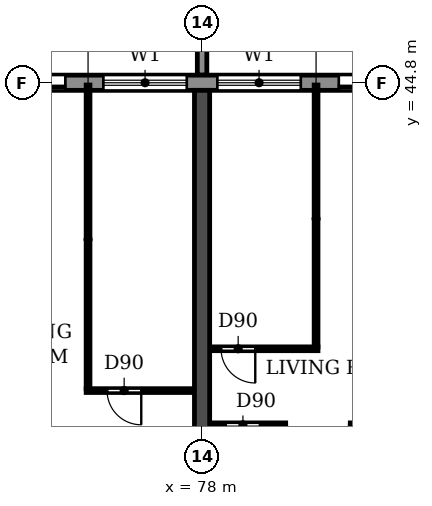
"""IFC4 building model, lengths in metres.
Left out: names, types, materials, properties, quantities, classifications, styles, units other than length and angle.
Written with IfcOpenShell. Run it as: python <this file> out.ifc"""

import sys

from ifc_helpers import new_model, si_unit, direction, frame, frame_2d, origin, place, context, subcontext, project, spatial, polyline, rectangle, outline, extrude, source, transform, mapped, element, fill, save


model = new_model("IFC4")
c1 = context("Model", 3, precision=1e-05, world=origin(), true_north=direction((0.0, 1.0)))
c2 = subcontext(c1, "Body", "Model", "MODEL_VIEW")
j1 = project(units=[si_unit("LENGTHUNIT", "METRE"), si_unit("PLANEANGLEUNIT", "RADIAN")], contexts=[c1])
p1 = place(None, origin())
s1 = spatial("IfcSite", under=j1, at=p1, CompositionType="ELEMENT")
p2 = place(p1, origin())
s2 = spatial("IfcBuilding", under=s1, at=p2, CompositionType="ELEMENT")
p3 = place(p2, frame((0.0, 0.0, 33.3)))
s3 = spatial("IfcBuildingStorey", under=s2, at=p3, CompositionType="ELEMENT", Elevation=33.3)
p4 = place(p3, frame((78.0, 30.55, 0.0), z_axis=(0.0, 0.0, 1.0), x_axis=(0.0, 1.0, 0.0)))
e1 = element("IfcWall", 1, at=p4, inside=s3, PredefinedType="SHEAR", context=c2, shape_type="SweptSolid", body=[
    extrude(rectangle(XDim=14.05, YDim=0.4, at=frame_2d((7.025, 0.0))), origin(), (0.0, 0.0, 1.0), 3.05),
])
p5 = place(p3, frame((97.317, 44.8, 0.0), z_axis=(0.0, 0.0, 1.0), x_axis=(-1.0, 0.0, 0.0)))
e2 = element("IfcWall", 2, at=p5, inside=s3, PredefinedType="STANDARD", context=c2, shape_type="SweptSolid", body=[
    extrude(rectangle(XDim=92.634, YDim=0.4, at=frame_2d((46.317, 0.0))), origin(), (0.0, 0.0, 1.0), 3.05),
])
p6 = place(p5, frame((88.717, 0.0, 0.9)))
e3 = element("IfcOpeningElement", 3, at=p6, cuts=e2, PredefinedType="OPENING", context=c2, shape_type="SweptSolid", body=[
    extrude(rectangle(XDim=2.2, YDim=1.5, at=frame_2d((1.1, 0.75))), frame((0.0, 0.21, 0.0), z_axis=(0.0, -1.0, 0.0), x_axis=(1.0, 0.0, 0.0)), (0.0, 0.0, 1.0), 0.42),
])
p7 = place(p5, frame((85.917, 0.0, 0.0)))
e4 = element("IfcOpeningElement", 4, at=p7, cuts=e2, PredefinedType="OPENING", context=c2, shape_type="SweptSolid", body=[
    extrude(rectangle(XDim=1.8, YDim=2.4, at=frame_2d((0.9, 1.2))), frame((0.0, 0.21, 0.0), z_axis=(0.0, -1.0, 0.0), x_axis=(1.0, 0.0, 0.0)), (0.0, 0.0, 1.0), 0.42),
])
p8 = place(p5, frame((82.717, 0.0, 0.9)))
e5 = element("IfcOpeningElement", 5, at=p8, cuts=e2, PredefinedType="OPENING", context=c2, shape_type="SweptSolid", body=[
    extrude(rectangle(XDim=2.2, YDim=1.5, at=frame_2d((1.1, 0.75))), frame((0.0, 0.21, 0.0), z_axis=(0.0, -1.0, 0.0), x_axis=(1.0, 0.0, 0.0)), (0.0, 0.0, 1.0), 0.42),
])
p9 = place(p5, frame((79.917, 0.0, 0.0)))
e6 = element("IfcOpeningElement", 6, at=p9, cuts=e2, PredefinedType="OPENING", context=c2, shape_type="SweptSolid", body=[
    extrude(rectangle(XDim=1.8, YDim=2.4, at=frame_2d((0.9, 1.2))), frame((0.0, 0.21, 0.0), z_axis=(0.0, -1.0, 0.0), x_axis=(1.0, 0.0, 0.0)), (0.0, 0.0, 1.0), 0.42),
])
p10 = place(p5, frame((76.717, 0.0, 0.9)))
e7 = element("IfcOpeningElement", 7, at=p10, cuts=e2, PredefinedType="OPENING", context=c2, shape_type="SweptSolid", body=[
    extrude(rectangle(XDim=2.2, YDim=1.5, at=frame_2d((1.1, 0.75))), frame((0.0, 0.21, 0.0), z_axis=(0.0, -1.0, 0.0), x_axis=(1.0, 0.0, 0.0)), (0.0, 0.0, 1.0), 0.42),
])
p11 = place(p5, frame((73.717, 0.0, 0.9)))
e8 = element("IfcOpeningElement", 8, at=p11, cuts=e2, PredefinedType="OPENING", context=c2, shape_type="SweptSolid", body=[
    extrude(rectangle(XDim=2.2, YDim=1.5, at=frame_2d((1.1, 0.75))), frame((0.0, 0.21, 0.0), z_axis=(0.0, -1.0, 0.0), x_axis=(1.0, 0.0, 0.0)), (0.0, 0.0, 1.0), 0.42),
])
p12 = place(p5, frame((70.717, 0.0, 0.9)))
e9 = element("IfcOpeningElement", 9, at=p12, cuts=e2, PredefinedType="OPENING", context=c2, shape_type="SweptSolid", body=[
    extrude(rectangle(XDim=2.2, YDim=1.5, at=frame_2d((1.1, 0.75))), frame((0.0, 0.21, 0.0), z_axis=(0.0, -1.0, 0.0), x_axis=(1.0, 0.0, 0.0)), (0.0, 0.0, 1.0), 0.42),
])
p13 = place(p5, frame((67.917, 0.0, 0.0)))
e10 = element("IfcOpeningElement", 10, at=p13, cuts=e2, PredefinedType="OPENING", context=c2, shape_type="SweptSolid", body=[
    extrude(rectangle(XDim=1.8, YDim=2.4, at=frame_2d((0.9, 1.2))), frame((0.0, 0.21, 0.0), z_axis=(0.0, -1.0, 0.0), x_axis=(1.0, 0.0, 0.0)), (0.0, 0.0, 1.0), 0.42),
])
p14 = place(p5, frame((64.717, 0.0, 0.9)))
e11 = element("IfcOpeningElement", 11, at=p14, cuts=e2, PredefinedType="OPENING", context=c2, shape_type="SweptSolid", body=[
    extrude(rectangle(XDim=2.2, YDim=1.5, at=frame_2d((1.1, 0.75))), frame((0.0, 0.21, 0.0), z_axis=(0.0, -1.0, 0.0), x_axis=(1.0, 0.0, 0.0)), (0.0, 0.0, 1.0), 0.42),
])
p15 = place(p5, frame((61.717, 0.0, 0.9)))
e12 = element("IfcOpeningElement", 12, at=p15, cuts=e2, PredefinedType="OPENING", context=c2, shape_type="SweptSolid", body=[
    extrude(rectangle(XDim=2.2, YDim=1.5, at=frame_2d((1.1, 0.75))), frame((0.0, 0.21, 0.0), z_axis=(0.0, -1.0, 0.0), x_axis=(1.0, 0.0, 0.0)), (0.0, 0.0, 1.0), 0.42),
])
p16 = place(p5, frame((58.717, 0.0, 0.9)))
e13 = element("IfcOpeningElement", 13, at=p16, cuts=e2, PredefinedType="OPENING", context=c2, shape_type="SweptSolid", body=[
    extrude(rectangle(XDim=2.2, YDim=1.5, at=frame_2d((1.1, 0.75))), frame((0.0, 0.21, 0.0), z_axis=(0.0, -1.0, 0.0), x_axis=(1.0, 0.0, 0.0)), (0.0, 0.0, 1.0), 0.42),
])
p17 = place(p5, frame((55.917, 0.0, 0.0)))
e14 = element("IfcOpeningElement", 14, at=p17, cuts=e2, PredefinedType="OPENING", context=c2, shape_type="SweptSolid", body=[
    extrude(rectangle(XDim=1.8, YDim=2.4, at=frame_2d((0.9, 1.2))), frame((0.0, 0.21, 0.0), z_axis=(0.0, -1.0, 0.0), x_axis=(1.0, 0.0, 0.0)), (0.0, 0.0, 1.0), 0.42),
])
p18 = place(p5, frame((52.717, 0.0, 0.9)))
e15 = element("IfcOpeningElement", 15, at=p18, cuts=e2, PredefinedType="OPENING", context=c2, shape_type="SweptSolid", body=[
    extrude(rectangle(XDim=2.2, YDim=1.5, at=frame_2d((1.1, 0.75))), frame((0.0, 0.21, 0.0), z_axis=(0.0, -1.0, 0.0), x_axis=(1.0, 0.0, 0.0)), (0.0, 0.0, 1.0), 0.42),
])
p19 = place(p5, frame((49.717, 0.0, 0.9)))
e16 = element("IfcOpeningElement", 16, at=p19, cuts=e2, PredefinedType="OPENING", context=c2, shape_type="SweptSolid", body=[
    extrude(rectangle(XDim=2.2, YDim=1.5, at=frame_2d((1.1, 0.75))), frame((0.0, 0.21, 0.0), z_axis=(0.0, -1.0, 0.0), x_axis=(1.0, 0.0, 0.0)), (0.0, 0.0, 1.0), 0.42),
])
p20 = place(p5, frame((46.717, 0.0, 0.9)))
e17 = element("IfcOpeningElement", 17, at=p20, cuts=e2, PredefinedType="OPENING", context=c2, shape_type="SweptSolid", body=[
    extrude(rectangle(XDim=2.2, YDim=1.5, at=frame_2d((1.1, 0.75))), frame((0.0, 0.21, 0.0), z_axis=(0.0, -1.0, 0.0), x_axis=(1.0, 0.0, 0.0)), (0.0, 0.0, 1.0), 0.42),
])
p21 = place(p5, frame((43.917, 0.0, 0.0)))
e18 = element("IfcOpeningElement", 18, at=p21, cuts=e2, PredefinedType="OPENING", context=c2, shape_type="SweptSolid", body=[
    extrude(rectangle(XDim=1.8, YDim=2.4, at=frame_2d((0.9, 1.2))), frame((0.0, 0.21, 0.0), z_axis=(0.0, -1.0, 0.0), x_axis=(1.0, 0.0, 0.0)), (0.0, 0.0, 1.0), 0.42),
])
p22 = place(p5, frame((40.717, 0.0, 0.9)))
e19 = element("IfcOpeningElement", 19, at=p22, cuts=e2, PredefinedType="OPENING", context=c2, shape_type="SweptSolid", body=[
    extrude(rectangle(XDim=2.2, YDim=1.5, at=frame_2d((1.1, 0.75))), frame((0.0, 0.21, 0.0), z_axis=(0.0, -1.0, 0.0), x_axis=(1.0, 0.0, 0.0)), (0.0, 0.0, 1.0), 0.42),
])
p23 = place(p5, frame((37.717, 0.0, 0.9)))
e20 = element("IfcOpeningElement", 20, at=p23, cuts=e2, PredefinedType="OPENING", context=c2, shape_type="SweptSolid", body=[
    extrude(rectangle(XDim=2.2, YDim=1.5, at=frame_2d((1.1, 0.75))), frame((0.0, 0.21, 0.0), z_axis=(0.0, -1.0, 0.0), x_axis=(1.0, 0.0, 0.0)), (0.0, 0.0, 1.0), 0.42),
])
p24 = place(p5, frame((34.717, 0.0, 0.9)))
e21 = element("IfcOpeningElement", 21, at=p24, cuts=e2, PredefinedType="OPENING", context=c2, shape_type="SweptSolid", body=[
    extrude(rectangle(XDim=2.2, YDim=1.5, at=frame_2d((1.1, 0.75))), frame((0.0, 0.21, 0.0), z_axis=(0.0, -1.0, 0.0), x_axis=(1.0, 0.0, 0.0)), (0.0, 0.0, 1.0), 0.42),
])
p25 = place(p5, frame((31.917, 0.0, 0.0)))
e22 = element("IfcOpeningElement", 22, at=p25, cuts=e2, PredefinedType="OPENING", context=c2, shape_type="SweptSolid", body=[
    extrude(rectangle(XDim=1.8, YDim=2.4, at=frame_2d((0.9, 1.2))), frame((0.0, 0.21, 0.0), z_axis=(0.0, -1.0, 0.0), x_axis=(1.0, 0.0, 0.0)), (0.0, 0.0, 1.0), 0.42),
])
p26 = place(p5, frame((28.717, 0.0, 0.9)))
e23 = element("IfcOpeningElement", 23, at=p26, cuts=e2, PredefinedType="OPENING", context=c2, shape_type="SweptSolid", body=[
    extrude(rectangle(XDim=2.2, YDim=1.5, at=frame_2d((1.1, 0.75))), frame((0.0, 0.21, 0.0), z_axis=(0.0, -1.0, 0.0), x_axis=(1.0, 0.0, 0.0)), (0.0, 0.0, 1.0), 0.42),
])
p27 = place(p5, frame((25.717, 0.0, 0.9)))
e24 = element("IfcOpeningElement", 24, at=p27, cuts=e2, PredefinedType="OPENING", context=c2, shape_type="SweptSolid", body=[
    extrude(rectangle(XDim=2.2, YDim=1.5, at=frame_2d((1.1, 0.75))), frame((0.0, 0.21, 0.0), z_axis=(0.0, -1.0, 0.0), x_axis=(1.0, 0.0, 0.0)), (0.0, 0.0, 1.0), 0.42),
])
p28 = place(p5, frame((22.917, 0.0, 0.0)))
e25 = element("IfcOpeningElement", 25, at=p28, cuts=e2, PredefinedType="OPENING", context=c2, shape_type="SweptSolid", body=[
    extrude(rectangle(XDim=1.8, YDim=2.4, at=frame_2d((0.9, 1.2))), frame((0.0, 0.21, 0.0), z_axis=(0.0, -1.0, 0.0), x_axis=(1.0, 0.0, 0.0)), (0.0, 0.0, 1.0), 0.42),
])
p29 = place(p5, frame((19.717, 0.0, 0.9)))
e26 = element("IfcOpeningElement", 26, at=p29, cuts=e2, PredefinedType="OPENING", context=c2, shape_type="SweptSolid", body=[
    extrude(rectangle(XDim=2.2, YDim=1.5, at=frame_2d((1.1, 0.75))), frame((0.0, 0.21, 0.0), z_axis=(0.0, -1.0, 0.0), x_axis=(1.0, 0.0, 0.0)), (0.0, 0.0, 1.0), 0.42),
])
p30 = place(p5, frame((16.717, 0.0, 0.9)))
e27 = element("IfcOpeningElement", 27, at=p30, cuts=e2, PredefinedType="OPENING", context=c2, shape_type="SweptSolid", body=[
    extrude(rectangle(XDim=2.2, YDim=1.5, at=frame_2d((1.1, 0.75))), frame((0.0, 0.21, 0.0), z_axis=(0.0, -1.0, 0.0), x_axis=(1.0, 0.0, 0.0)), (0.0, 0.0, 1.0), 0.42),
])
p31 = place(p5, frame((13.917, 0.0, 0.0)))
e28 = element("IfcOpeningElement", 28, at=p31, cuts=e2, PredefinedType="OPENING", context=c2, shape_type="SweptSolid", body=[
    extrude(rectangle(XDim=1.8, YDim=2.4, at=frame_2d((0.9, 1.2))), frame((0.0, 0.21, 0.0), z_axis=(0.0, -1.0, 0.0), x_axis=(1.0, 0.0, 0.0)), (0.0, 0.0, 1.0), 0.42),
])
p32 = place(p5, frame((10.717, 0.0, 0.9)))
e29 = element("IfcOpeningElement", 29, at=p32, cuts=e2, PredefinedType="OPENING", context=c2, shape_type="SweptSolid", body=[
    extrude(rectangle(XDim=2.2, YDim=1.5, at=frame_2d((1.1, 0.75))), frame((0.0, 0.21, 0.0), z_axis=(0.0, -1.0, 0.0), x_axis=(1.0, 0.0, 0.0)), (0.0, 0.0, 1.0), 0.42),
])
p33 = place(p5, frame((7.917, 0.0, 0.0)))
e30 = element("IfcOpeningElement", 30, at=p33, cuts=e2, PredefinedType="OPENING", context=c2, shape_type="SweptSolid", body=[
    extrude(rectangle(XDim=1.8, YDim=2.4, at=frame_2d((0.9, 1.2))), frame((0.0, 0.21, 0.0), z_axis=(0.0, -1.0, 0.0), x_axis=(1.0, 0.0, 0.0)), (0.0, 0.0, 1.0), 0.42),
])
p34 = place(p5, frame((4.717, 0.0, 0.9)))
e31 = element("IfcOpeningElement", 31, at=p34, cuts=e2, PredefinedType="OPENING", context=c2, shape_type="SweptSolid", body=[
    extrude(rectangle(XDim=2.2, YDim=1.5, at=frame_2d((1.1, 0.75))), frame((0.0, 0.21, 0.0), z_axis=(0.0, -1.0, 0.0), x_axis=(1.0, 0.0, 0.0)), (0.0, 0.0, 1.0), 0.42),
])
p35 = place(p5, frame((1.917, 0.0, 0.0)))
e32 = element("IfcOpeningElement", 32, at=p35, cuts=e2, PredefinedType="OPENING", context=c2, shape_type="SweptSolid", body=[
    extrude(rectangle(XDim=1.8, YDim=2.4, at=frame_2d((0.9, 1.2))), frame((0.0, 0.21, 0.0), z_axis=(0.0, -1.0, 0.0), x_axis=(1.0, 0.0, 0.0)), (0.0, 0.0, 1.0), 0.42),
])
m1 = source(origin(), c2, "Body", "SweptSolid", [
    extrude(outline(polyline([(0.0, 0.0), (0.25, 0.0), (0.25, 3.1), (0.0, 3.1), (0.0, 0.0)])), origin(), (0.0, 0.0, 1.0), 3.1),
])
p36 = place(p3, frame((77.875, 45.0, 0.0)))
e33 = element("IfcWall", 33, at=p36, inside=s3, PredefinedType="STANDARD", context=c2, shape_type="MappedRepresentation", body=[
    mapped(m1, transform((0.0, 0.0, 0.0))),
])
p37 = place(p3, frame((78.21, 35.8, 0.0), z_axis=(0.0, 0.0, 1.0), x_axis=(1.0, 0.0, 0.0)))
e34 = element("IfcWall", 34, at=p37, inside=s3, PredefinedType="PARTITIONING", context=c2, shape_type="SweptSolid", body=[
    extrude(rectangle(XDim=1.99, YDim=0.1, at=frame_2d((0.995, 0.0))), origin(), (0.0, 0.0, 1.0), 3.05),
])
p38 = place(p37, frame((0.415, 0.0, 0.0)))
e35 = element("IfcOpeningElement", 35, at=p38, cuts=e34, PredefinedType="OPENING", context=c2, shape_type="SweptSolid", body=[
    extrude(rectangle(XDim=0.9, YDim=2.1, at=frame_2d((0.45, 1.05))), frame((0.0, 0.06, 0.0), z_axis=(0.0, -1.0, 0.0), x_axis=(1.0, 0.0, 0.0)), (0.0, 0.0, 1.0), 0.12),
])
p39 = place(p3, frame((81.9, 35.8, 0.0), z_axis=(0.0, 0.0, 1.0), x_axis=(1.0, 0.0, 0.0)))
e36 = element("IfcWall", 36, at=p39, inside=s3, PredefinedType="PARTITIONING", context=c2, shape_type="SweptSolid", body=[
    extrude(rectangle(XDim=1.89, YDim=0.1, at=frame_2d((0.945, 0.0))), origin(), (0.0, 0.0, 1.0), 3.05),
])
p40 = place(p39, frame((0.675, 0.0, 0.0)))
e37 = element("IfcOpeningElement", 37, at=p40, cuts=e36, PredefinedType="OPENING", context=c2, shape_type="SweptSolid", body=[
    extrude(rectangle(XDim=0.8, YDim=2.1, at=frame_2d((0.4, 1.05))), frame((0.0, 0.06, 0.0), z_axis=(0.0, -1.0, 0.0), x_axis=(1.0, 0.0, 0.0)), (0.0, 0.0, 1.0), 0.12),
])
p41 = place(p3, frame((74.95, 36.7, 0.0), z_axis=(0.0, 0.0, 1.0), x_axis=(1.0, 0.0, 0.0)))
e38 = element("IfcWall", 38, at=p41, inside=s3, PredefinedType="PARTITIONING", context=c2, shape_type="SweptSolid", body=[
    extrude(rectangle(XDim=2.84, YDim=0.1, at=frame_2d((1.42, 0.0))), origin(), (0.0, 0.0, 1.0), 3.05),
])
p42 = place(p41, frame((0.55, 0.0, 0.0)))
e39 = element("IfcOpeningElement", 39, at=p42, cuts=e38, PredefinedType="OPENING", context=c2, shape_type="SweptSolid", body=[
    extrude(rectangle(XDim=0.9, YDim=2.1, at=frame_2d((0.45, 1.05))), frame((0.0, 0.06, 0.0), z_axis=(0.0, -1.0, 0.0), x_axis=(1.0, 0.0, 0.0)), (0.0, 0.0, 1.0), 0.12),
])
p43 = place(p3, frame((78.21, 37.8, 0.0), z_axis=(0.0, 0.0, 1.0), x_axis=(1.0, 0.0, 0.0)))
e40 = element("IfcWall", 40, at=p43, inside=s3, PredefinedType="PARTITIONING", context=c2, shape_type="SweptSolid", body=[
    extrude(rectangle(XDim=2.84, YDim=0.1, at=frame_2d((1.42, 0.0))), origin(), (0.0, 0.0, 1.0), 3.05),
])
p44 = place(p43, frame((0.29, 0.0, 0.0)))
e41 = element("IfcOpeningElement", 41, at=p44, cuts=e40, PredefinedType="OPENING", context=c2, shape_type="SweptSolid", body=[
    extrude(rectangle(XDim=0.9, YDim=2.1, at=frame_2d((0.45, 1.05))), frame((0.0, 0.06, 0.0), z_axis=(0.0, -1.0, 0.0), x_axis=(1.0, 0.0, 0.0)), (0.0, 0.0, 1.0), 0.12),
])
p45 = place(p3, frame((75.0, 36.75, 0.0), z_axis=(0.0, 0.0, 1.0), x_axis=(0.0, 1.0, 0.0)))
e42 = element("IfcWall", 42, at=p45, inside=s3, PredefinedType="PARTITIONING", context=c2, shape_type="SweptSolid", body=[
    extrude(rectangle(XDim=7.99, YDim=0.1, at=frame_2d((3.995, 0.0))), origin(), (0.0, 0.0, 1.0), 3.05),
])
p46 = place(p3, frame((81.0, 37.85, 0.0), z_axis=(0.0, 0.0, 1.0), x_axis=(0.0, 1.0, 0.0)))
e43 = element("IfcWall", 43, at=p46, inside=s3, PredefinedType="PARTITIONING", context=c2, shape_type="SweptSolid", body=[
    extrude(rectangle(XDim=6.89, YDim=0.1, at=frame_2d((3.445, 0.0))), origin(), (0.0, 0.0, 1.0), 3.05),
])
p47 = place(p28, origin())
e44 = element("IfcDoor", 44, at=p47, inside=s3, OperationType="DOUBLE_DOOR_SLIDING", PredefinedType="DOOR", context=c2, shape_type="SweptSolid", body=[
    extrude(rectangle(XDim=1.8, YDim=2.4, at=frame_2d((0.9, 1.2))), frame((0.0, 0.025, 0.0), z_axis=(0.0, -1.0, 0.0), x_axis=(1.0, 0.0, 0.0)), (0.0, 0.0, 1.0), 0.05),
])
fill(e25, e44)
p48 = place(p29, origin())
e45 = element("IfcWindow", 45, at=p48, inside=s3, PartitioningType="DOUBLE_PANEL_HORIZONTAL", PredefinedType="WINDOW", context=c2, shape_type="SweptSolid", body=[
    extrude(rectangle(XDim=2.2, YDim=1.5, at=frame_2d((1.1, 0.75))), frame((0.0, 0.03, 0.0), z_axis=(0.0, -1.0, 0.0), x_axis=(1.0, 0.0, 0.0)), (0.0, 0.0, 1.0), 0.06),
])
fill(e26, e45)
p49 = place(p30, origin())
e46 = element("IfcWindow", 46, at=p49, inside=s3, PartitioningType="DOUBLE_PANEL_HORIZONTAL", PredefinedType="WINDOW", context=c2, shape_type="SweptSolid", body=[
    extrude(rectangle(XDim=2.2, YDim=1.5, at=frame_2d((1.1, 0.75))), frame((0.0, 0.03, 0.0), z_axis=(0.0, -1.0, 0.0), x_axis=(1.0, 0.0, 0.0)), (0.0, 0.0, 1.0), 0.06),
])
fill(e27, e46)
p50 = place(p31, origin())
e47 = element("IfcDoor", 47, at=p50, inside=s3, OperationType="DOUBLE_DOOR_SLIDING", PredefinedType="DOOR", context=c2, shape_type="SweptSolid", body=[
    extrude(rectangle(XDim=1.8, YDim=2.4, at=frame_2d((0.9, 1.2))), frame((0.0, 0.025, 0.0), z_axis=(0.0, -1.0, 0.0), x_axis=(1.0, 0.0, 0.0)), (0.0, 0.0, 1.0), 0.05),
])
fill(e28, e47)
p51 = place(p42, frame((0.9, 0.0, 0.0), z_axis=(0.0, 0.0, 1.0), x_axis=(-1.0, 0.0, 0.0)))
e48 = element("IfcDoor", 48, at=p51, inside=s3, OperationType="SINGLE_SWING_LEFT", PredefinedType="DOOR", context=c2, shape_type="SweptSolid", body=[
    extrude(rectangle(XDim=0.9, YDim=2.1, at=frame_2d((0.45, 1.05))), frame((0.0, 0.025, 0.0), z_axis=(0.0, -1.0, 0.0), x_axis=(1.0, 0.0, 0.0)), (0.0, 0.0, 1.0), 0.05),
])
fill(e39, e48)
p52 = place(p44, frame((0.9, 0.0, 0.0), z_axis=(0.0, 0.0, 1.0), x_axis=(-1.0, 0.0, 0.0)))
e49 = element("IfcDoor", 49, at=p52, inside=s3, OperationType="SINGLE_SWING_LEFT", PredefinedType="DOOR", context=c2, shape_type="SweptSolid", body=[
    extrude(rectangle(XDim=0.9, YDim=2.1, at=frame_2d((0.45, 1.05))), frame((0.0, 0.025, 0.0), z_axis=(0.0, -1.0, 0.0), x_axis=(1.0, 0.0, 0.0)), (0.0, 0.0, 1.0), 0.05),
])
fill(e41, e49)
p53 = place(p38, frame((0.9, 0.0, 0.0), z_axis=(0.0, 0.0, 1.0), x_axis=(-1.0, 0.0, 0.0)))
e50 = element("IfcDoor", 50, at=p53, inside=s3, OperationType="SINGLE_SWING_RIGHT", PredefinedType="DOOR", context=c2, shape_type="SweptSolid", body=[
    extrude(rectangle(XDim=0.9, YDim=2.1, at=frame_2d((0.45, 1.05))), frame((0.0, 0.025, 0.0), z_axis=(0.0, -1.0, 0.0), x_axis=(1.0, 0.0, 0.0)), (0.0, 0.0, 1.0), 0.05),
])
fill(e35, e50)
save(model, sys.argv[1])
